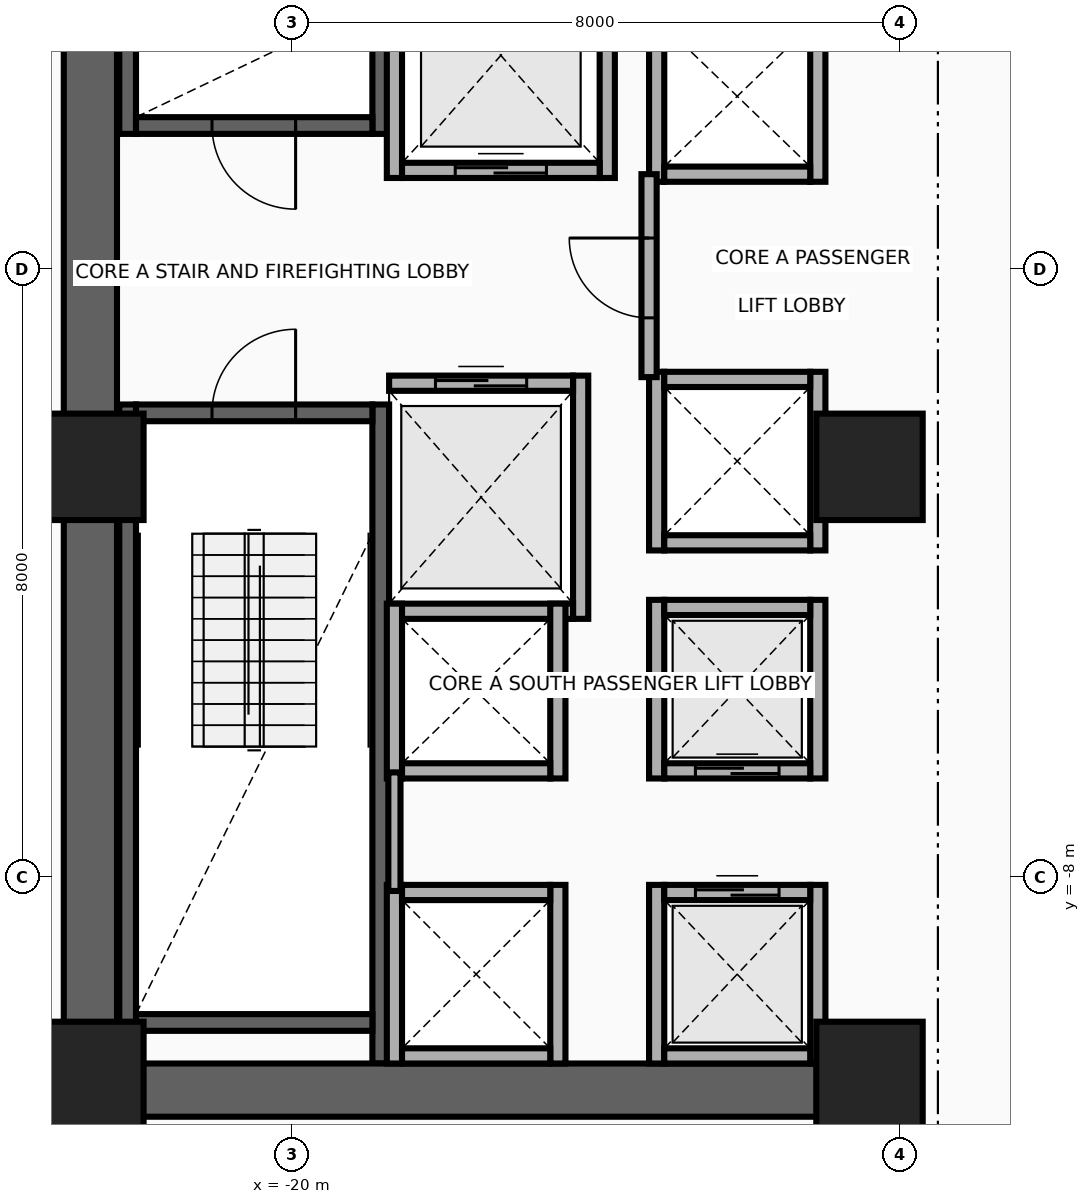
"""IFC4 building model, lengths in metres.
Left out: names, types, materials, properties, quantities, classifications, styles, units other than length and angle.
Written with IfcOpenShell. Run it as: python <this file> out.ifc"""

import sys

from ifc_helpers import new_model, si_unit, direction, frame, frame_2d, origin, origin_2d, place, context, subcontext, project, spatial, rectangle, extrude, source, transform, mapped, element, fill, save


model = new_model("IFC4")
c1 = context("Model", 3, precision=1e-05, world=origin(), true_north=direction((0.0, 1.0)))
c2 = subcontext(c1, "Body", "Model", "MODEL_VIEW")
j1 = project(units=[si_unit("LENGTHUNIT", "METRE"), si_unit("PLANEANGLEUNIT", "RADIAN")], contexts=[c1])
p1 = place(None, origin())
s1 = spatial("IfcSite", under=j1, at=p1, CompositionType="ELEMENT")
p2 = place(p1, origin())
s2 = spatial("IfcBuilding", under=s1, at=p2, CompositionType="ELEMENT")
p3 = place(p2, frame((0.0, 0.0, 92.6)))
s3 = spatial("IfcBuildingStorey", under=s2, at=p3, CompositionType="ELEMENT", Elevation=92.6)
for number, where, z_axis, x_axis in (
    (1, (-22.16, 1.78, 0.0), (0.0, 0.0, 1.0), (0.0, 1.0, 0.0)),
    (2, (-18.83, 1.78, 0.0), (0.0, 0.0, 1.0), (0.0, 1.0, 0.0)),
):
    element("IfcWall", number, at=place(p3, frame(where, z_axis=z_axis, x_axis=x_axis)), inside=s3, PredefinedType="SHEAR", context=c2, shape_type="SweptSolid", body=[
        extrude(rectangle(XDim=8.67, YDim=0.22, at=frame_2d((4.335, 0.0))), origin(), (0.0, 0.0, 1.0), 3.46),
    ])
p4 = place(p3, frame((-22.05, 1.89, 0.0), z_axis=(0.0, 0.0, 1.0), x_axis=(1.0, 0.0, 0.0)))
e3 = element("IfcWall", 3, at=p4, inside=s3, PredefinedType="SHEAR", context=c2, shape_type="SweptSolid", body=[
    extrude(rectangle(XDim=3.11, YDim=0.22, at=frame_2d((1.555, 0.0))), origin(), (0.0, 0.0, 1.0), 3.46),
])
p5 = place(p4, frame((1.0, 0.0, 0.0)))
e4 = element("IfcOpeningElement", 4, at=p5, cuts=e3, PredefinedType="OPENING", context=c2, shape_type="SweptSolid", body=[
    extrude(rectangle(XDim=1.1, YDim=2.15, at=frame_2d((0.55, 1.075))), frame((0.0, 0.125, 0.0), z_axis=(0.0, -1.0, 0.0), x_axis=(1.0, 0.0, 0.0)), (0.0, 0.0, 1.0), 0.25),
])
for number, where, z_axis, x_axis in (
    (5, (-22.16, -10.45, 0.0), (0.0, 0.0, 1.0), (0.0, 1.0, 0.0)),
    (6, (-18.83, -10.45, 0.0), (0.0, 0.0, 1.0), (0.0, 1.0, 0.0)),
):
    element("IfcWall", number, at=place(p3, frame(where, z_axis=z_axis, x_axis=x_axis)), inside=s3, PredefinedType="SHEAR", context=c2, shape_type="SweptSolid", body=[
        extrude(rectangle(XDim=8.67, YDim=0.22, at=frame_2d((4.335, 0.0))), origin(), (0.0, 0.0, 1.0), 3.46),
    ])
p6 = place(p3, frame((-22.05, -9.91, 0.0), z_axis=(0.0, 0.0, 1.0), x_axis=(1.0, 0.0, 0.0)))
e7 = element("IfcWall", 7, at=p6, inside=s3, PredefinedType="SHEAR", context=c2, shape_type="SweptSolid", body=[
    extrude(rectangle(XDim=3.11, YDim=0.22, at=frame_2d((1.555, 0.0))), origin(), (0.0, 0.0, 1.0), 3.46),
])
p7 = place(p3, frame((-22.05, -1.89, 0.0), z_axis=(0.0, 0.0, 1.0), x_axis=(1.0, 0.0, 0.0)))
e8 = element("IfcWall", 8, at=p7, inside=s3, PredefinedType="SHEAR", context=c2, shape_type="SweptSolid", body=[
    extrude(rectangle(XDim=3.11, YDim=0.22, at=frame_2d((1.555, 0.0))), origin(), (0.0, 0.0, 1.0), 3.46),
])
p8 = place(p7, frame((1.0, 0.0, 0.0)))
e9 = element("IfcOpeningElement", 9, at=p8, cuts=e8, PredefinedType="OPENING", context=c2, shape_type="SweptSolid", body=[
    extrude(rectangle(XDim=1.1, YDim=2.15, at=frame_2d((0.55, 1.075))), frame((0.0, 0.125, 0.0), z_axis=(0.0, -1.0, 0.0), x_axis=(1.0, 0.0, 0.0)), (0.0, 0.0, 1.0), 0.25),
])
p9 = place(p3, frame((-22.65, -11.15, 0.0), z_axis=(0.0, 0.0, 1.0), x_axis=(0.0, 1.0, 0.0)))
e10 = element("IfcWall", 10, at=p9, inside=s3, PredefinedType="SHEAR", context=c2, shape_type="SweptSolid", body=[
    extrude(rectangle(XDim=22.3, YDim=0.7, at=frame_2d((11.15, 0.0))), origin(), (0.0, 0.0, 1.0), 3.46),
])
p10 = place(p3, frame((-22.65, -10.8, 0.0), z_axis=(0.0, 0.0, 1.0), x_axis=(1.0, 0.0, 0.0)))
e11 = element("IfcWall", 11, at=p10, inside=s3, PredefinedType="SHEAR", context=c2, shape_type="SweptSolid", body=[
    extrude(rectangle(XDim=10.25, YDim=0.7, at=frame_2d((5.125, 0.0))), origin(), (0.0, 0.0, 1.0), 3.46),
])
m1 = source(origin(), c2, "Body", "SweptSolid", [
    extrude(rectangle(XDim=1.4, YDim=1.4, at=origin_2d()), origin(), (0.0, 0.0, 1.0), 3.7),
])
for number, where, z_axis, x_axis in (
    (12, (-22.65, -10.6, 0.0), (0.0, 0.0, 1.0), (1.0, 0.0, 0.0)),
    (13, (-12.4, -10.6, 0.0), (0.0, 0.0, 1.0), (1.0, 0.0, 0.0)),
    (14, (-22.65, -2.6, 0.0), (0.0, 0.0, 1.0), (1.0, 0.0, 0.0)),
    (15, (-12.4, -2.6, 0.0), (0.0, 0.0, 1.0), (1.0, 0.0, 0.0)),
):
    element("IfcColumn", number, at=place(p3, frame(where, z_axis=z_axis, x_axis=x_axis)), inside=s3, PredefinedType="COLUMN", context=c2, shape_type="MappedRepresentation", body=[
        mapped(m1, transform((0.0, 0.0, 0.0), x_axis=(1.0, 0.0, 0.0), y_axis=(0.0, 1.0, 0.0), z_axis=(0.0, 0.0, 1.0), scale=1.0)),
    ])
for number, where, z_axis, x_axis in (
    (16, (-18.65, 1.2, 0.0), (0.0, 0.0, 1.0), (0.0, 1.0, 0.0)),
    (17, (-15.85, 1.2, 0.0), (0.0, 0.0, 1.0), (0.0, 1.0, 0.0)),
):
    element("IfcWall", number, at=place(p3, frame(where, z_axis=z_axis, x_axis=x_axis)), inside=s3, PredefinedType="MOVABLE", context=c2, shape_type="SweptSolid", body=[
        extrude(rectangle(XDim=3.225, YDim=0.2, at=frame_2d((1.613, 0.0))), origin(), (0.0, 0.0, 1.0), 3.46),
    ])
p11 = place(p3, frame((-18.55, 1.3, 0.0), z_axis=(0.0, 0.0, 1.0), x_axis=(1.0, 0.0, 0.0)))
e18 = element("IfcWall", 18, at=p11, inside=s3, PredefinedType="MOVABLE", context=c2, shape_type="SweptSolid", body=[
    extrude(rectangle(XDim=2.6, YDim=0.2, at=frame_2d((1.3, 0.0))), origin(), (0.0, 0.0, 1.0), 3.46),
])
p12 = place(p11, frame((0.7, 0.0, 0.0)))
e19 = element("IfcOpeningElement", 19, at=p12, cuts=e18, PredefinedType="OPENING", context=c2, shape_type="SweptSolid", body=[
    extrude(rectangle(XDim=1.2, YDim=2.1, at=frame_2d((0.6, 1.05))), frame((0.0, 0.115, 0.0), z_axis=(0.0, -1.0, 0.0), x_axis=(1.0, 0.0, 0.0)), (0.0, 0.0, 1.0), 0.23),
])
p13 = place(p3, frame((-16.2, -4.6, 0.0), z_axis=(0.0, 0.0, 1.0), x_axis=(0.0, 1.0, 0.0)))
e20 = element("IfcWall", 20, at=p13, inside=s3, PredefinedType="MOVABLE", context=c2, shape_type="SweptSolid", body=[
    extrude(rectangle(XDim=3.2, YDim=0.2, at=frame_2d((1.6, 0.0))), origin(), (0.0, 0.0, 1.0), 3.46),
])
p14 = place(p3, frame((-18.72, -4.5, 0.0), z_axis=(0.0, 0.0, 1.0), x_axis=(1.0, 0.0, 0.0)))
e21 = element("IfcWall", 21, at=p14, inside=s3, PredefinedType="MOVABLE", context=c2, shape_type="SweptSolid", body=[
    extrude(rectangle(XDim=2.42, YDim=0.2, at=frame_2d((1.21, 0.0))), origin(), (0.0, 0.0, 1.0), 3.46),
])
p15 = place(p3, frame((-18.72, -1.5, 0.0), z_axis=(0.0, 0.0, 1.0), x_axis=(1.0, 0.0, 0.0)))
e22 = element("IfcWall", 22, at=p15, inside=s3, PredefinedType="MOVABLE", context=c2, shape_type="SweptSolid", body=[
    extrude(rectangle(XDim=2.42, YDim=0.2, at=frame_2d((1.21, 0.0))), origin(), (0.0, 0.0, 1.0), 3.46),
])
p16 = place(p15, frame((0.61, 0.0, 0.0)))
e23 = element("IfcOpeningElement", 23, at=p16, cuts=e22, PredefinedType="OPENING", context=c2, shape_type="SweptSolid", body=[
    extrude(rectangle(XDim=1.2, YDim=2.1, at=frame_2d((0.6, 1.05))), frame((0.0, 0.115, 0.0), z_axis=(0.0, -1.0, 0.0), x_axis=(1.0, 0.0, 0.0)), (0.0, 0.0, 1.0), 0.23),
])
for number, where, z_axis, x_axis in (
    (24, (-15.2, -10.45, 0.0), (0.0, 0.0, 1.0), (0.0, 1.0, 0.0)),
    (25, (-13.08, -10.45, 0.0), (0.0, 0.0, 1.0), (0.0, 1.0, 0.0)),
):
    element("IfcWall", number, at=place(p3, frame(where, z_axis=z_axis, x_axis=x_axis)), inside=s3, PredefinedType="MOVABLE", context=c2, shape_type="SweptSolid", body=[
        extrude(rectangle(XDim=2.35, YDim=0.2, at=frame_2d((1.175, 0.0))), origin(), (0.0, 0.0, 1.0), 2.583),
    ])
p17 = place(p3, frame((-15.1, -10.35, 0.0), z_axis=(0.0, 0.0, 1.0), x_axis=(1.0, 0.0, 0.0)))
e26 = element("IfcWall", 26, at=p17, inside=s3, PredefinedType="MOVABLE", context=c2, shape_type="SweptSolid", body=[
    extrude(rectangle(XDim=1.92, YDim=0.2, at=frame_2d((0.96, 0.0))), origin(), (0.0, 0.0, 1.0), 2.583),
])
p18 = place(p3, frame((-15.1, -8.2, 0.0), z_axis=(0.0, 0.0, 1.0), x_axis=(1.0, 0.0, 0.0)))
e27 = element("IfcWall", 27, at=p18, inside=s3, PredefinedType="MOVABLE", context=c2, shape_type="SweptSolid", body=[
    extrude(rectangle(XDim=1.92, YDim=0.2, at=frame_2d((0.96, 0.0))), origin(), (0.0, 0.0, 1.0), 3.46),
])
p19 = place(p18, frame((0.41, 0.0, 0.0)))
e28 = element("IfcOpeningElement", 28, at=p19, cuts=e27, PredefinedType="OPENING", context=c2, shape_type="SweptSolid", body=[
    extrude(rectangle(XDim=1.1, YDim=2.1, at=frame_2d((0.55, 1.05))), frame((0.0, 0.115, 0.0), z_axis=(0.0, -1.0, 0.0), x_axis=(1.0, 0.0, 0.0)), (0.0, 0.0, 1.0), 0.23),
])
for number, where, z_axis, x_axis in (
    (29, (-15.2, -6.7, 0.0), (0.0, 0.0, 1.0), (0.0, 1.0, 0.0)),
    (30, (-13.08, -6.7, 0.0), (0.0, 0.0, 1.0), (0.0, 1.0, 0.0)),
):
    element("IfcWall", number, at=place(p3, frame(where, z_axis=z_axis, x_axis=x_axis)), inside=s3, PredefinedType="MOVABLE", context=c2, shape_type="SweptSolid", body=[
        extrude(rectangle(XDim=2.35, YDim=0.2, at=frame_2d((1.175, 0.0))), origin(), (0.0, 0.0, 1.0), 3.46),
    ])
p20 = place(p3, frame((-15.1, -6.6, 0.0), z_axis=(0.0, 0.0, 1.0), x_axis=(1.0, 0.0, 0.0)))
e31 = element("IfcWall", 31, at=p20, inside=s3, PredefinedType="MOVABLE", context=c2, shape_type="SweptSolid", body=[
    extrude(rectangle(XDim=1.92, YDim=0.2, at=frame_2d((0.96, 0.0))), origin(), (0.0, 0.0, 1.0), 3.46),
])
p21 = place(p20, frame((0.41, 0.0, 0.0)))
e32 = element("IfcOpeningElement", 32, at=p21, cuts=e31, PredefinedType="OPENING", context=c2, shape_type="SweptSolid", body=[
    extrude(rectangle(XDim=1.1, YDim=2.1, at=frame_2d((0.55, 1.05))), frame((0.0, 0.115, 0.0), z_axis=(0.0, -1.0, 0.0), x_axis=(1.0, 0.0, 0.0)), (0.0, 0.0, 1.0), 0.23),
])
p22 = place(p3, frame((-15.1, -4.45, 0.0), z_axis=(0.0, 0.0, 1.0), x_axis=(1.0, 0.0, 0.0)))
e33 = element("IfcWall", 33, at=p22, inside=s3, PredefinedType="MOVABLE", context=c2, shape_type="SweptSolid", body=[
    extrude(rectangle(XDim=1.92, YDim=0.2, at=frame_2d((0.96, 0.0))), origin(), (0.0, 0.0, 1.0), 3.46),
])
for number, where, z_axis, x_axis in (
    (34, (-18.65, -10.45, 0.0), (0.0, 0.0, 1.0), (0.0, 1.0, 0.0)),
    (35, (-16.5, -10.45, 0.0), (0.0, 0.0, 1.0), (0.0, 1.0, 0.0)),
):
    element("IfcWall", number, at=place(p3, frame(where, z_axis=z_axis, x_axis=x_axis)), inside=s3, PredefinedType="MOVABLE", context=c2, shape_type="SweptSolid", body=[
        extrude(rectangle(XDim=2.35, YDim=0.2, at=frame_2d((1.175, 0.0))), origin(), (0.0, 0.0, 1.0), 2.583),
    ])
p23 = place(p3, frame((-18.55, -10.35, 0.0), z_axis=(0.0, 0.0, 1.0), x_axis=(1.0, 0.0, 0.0)))
e36 = element("IfcWall", 36, at=p23, inside=s3, PredefinedType="MOVABLE", context=c2, shape_type="SweptSolid", body=[
    extrude(rectangle(XDim=1.95, YDim=0.2, at=frame_2d((0.975, 0.0))), origin(), (0.0, 0.0, 1.0), 2.583),
])
p24 = place(p3, frame((-18.55, -8.2, 0.0), z_axis=(0.0, 0.0, 1.0), x_axis=(1.0, 0.0, 0.0)))
e37 = element("IfcWall", 37, at=p24, inside=s3, PredefinedType="MOVABLE", context=c2, shape_type="SweptSolid", body=[
    extrude(rectangle(XDim=1.95, YDim=0.2, at=frame_2d((0.975, 0.0))), origin(), (0.0, 0.0, 1.0), 3.46),
])
for number, where, z_axis, x_axis in (
    (38, (-15.2, 1.15, 0.0), (0.0, 0.0, 1.0), (0.0, 1.0, 0.0)),
    (39, (-13.08, 1.15, 0.0), (0.0, 0.0, 1.0), (0.0, 1.0, 0.0)),
):
    element("IfcWall", number, at=place(p3, frame(where, z_axis=z_axis, x_axis=x_axis)), inside=s3, PredefinedType="MOVABLE", context=c2, shape_type="SweptSolid", body=[
        extrude(rectangle(XDim=2.25, YDim=0.2, at=frame_2d((1.125, 0.0))), origin(), (0.0, 0.0, 1.0), 3.46),
    ])
p25 = place(p3, frame((-15.1, 1.25, 0.0), z_axis=(0.0, 0.0, 1.0), x_axis=(1.0, 0.0, 0.0)))
e40 = element("IfcWall", 40, at=p25, inside=s3, PredefinedType="MOVABLE", context=c2, shape_type="SweptSolid", body=[
    extrude(rectangle(XDim=1.92, YDim=0.2, at=frame_2d((0.96, 0.0))), origin(), (0.0, 0.0, 1.0), 3.46),
])
for number, where, z_axis, x_axis in (
    (41, (-18.65, -6.7, 0.0), (0.0, 0.0, 1.0), (0.0, 1.0, 0.0)),
    (42, (-16.5, -6.7, 0.0), (0.0, 0.0, 1.0), (0.0, 1.0, 0.0)),
):
    element("IfcWall", number, at=place(p3, frame(where, z_axis=z_axis, x_axis=x_axis)), inside=s3, PredefinedType="MOVABLE", context=c2, shape_type="SweptSolid", body=[
        extrude(rectangle(XDim=2.3, YDim=0.2, at=frame_2d((1.15, 0.0))), origin(), (0.0, 0.0, 1.0), 3.46),
    ])
p26 = place(p3, frame((-18.55, -6.6, 0.0), z_axis=(0.0, 0.0, 1.0), x_axis=(1.0, 0.0, 0.0)))
e43 = element("IfcWall", 43, at=p26, inside=s3, PredefinedType="MOVABLE", context=c2, shape_type="SweptSolid", body=[
    extrude(rectangle(XDim=1.95, YDim=0.2, at=frame_2d((0.975, 0.0))), origin(), (0.0, 0.0, 1.0), 3.46),
])
for number, where, z_axis, x_axis in (
    (44, (-15.2, -3.7, 0.0), (0.0, 0.0, 1.0), (0.0, 1.0, 0.0)),
    (45, (-13.08, -3.7, 0.0), (0.0, 0.0, 1.0), (0.0, 1.0, 0.0)),
):
    element("IfcWall", number, at=place(p3, frame(where, z_axis=z_axis, x_axis=x_axis)), inside=s3, PredefinedType="MOVABLE", context=c2, shape_type="SweptSolid", body=[
        extrude(rectangle(XDim=2.35, YDim=0.2, at=frame_2d((1.175, 0.0))), origin(), (0.0, 0.0, 1.0), 3.46),
    ])
for number, where, z_axis, x_axis in (
    (46, (-15.1, -3.6, 0.0), (0.0, 0.0, 1.0), (1.0, 0.0, 0.0)),
    (47, (-15.1, -1.45, 0.0), (0.0, 0.0, 1.0), (1.0, 0.0, 0.0)),
):
    element("IfcWall", number, at=place(p3, frame(where, z_axis=z_axis, x_axis=x_axis)), inside=s3, PredefinedType="MOVABLE", context=c2, shape_type="SweptSolid", body=[
        extrude(rectangle(XDim=1.92, YDim=0.2, at=frame_2d((0.96, 0.0))), origin(), (0.0, 0.0, 1.0), 3.46),
    ])
p27 = place(p3, frame((-15.3, -1.42, 0.0), z_axis=(0.0, 0.0, 1.0), x_axis=(0.0, 1.0, 0.0)))
e48 = element("IfcWall", 48, at=p27, inside=s3, PredefinedType="PARTITIONING", context=c2, shape_type="SweptSolid", body=[
    extrude(rectangle(XDim=2.67, YDim=0.2, at=frame_2d((1.335, 0.0))), origin(), (0.0, 0.0, 1.0), 3.46),
])
p28 = place(p27, frame((0.78, 0.0, 0.0)))
e49 = element("IfcOpeningElement", 49, at=p28, cuts=e48, PredefinedType="OPENING", context=c2, shape_type="SweptSolid", body=[
    extrude(rectangle(XDim=1.05, YDim=2.15, at=frame_2d((0.525, 1.075))), frame((0.0, 0.115, 0.0), z_axis=(0.0, -1.0, 0.0), x_axis=(1.0, 0.0, 0.0)), (0.0, 0.0, 1.0), 0.23),
])
p29 = place(p3, frame((-18.65, -8.18, 0.0), z_axis=(0.0, 0.0, 1.0), x_axis=(0.0, 1.0, 0.0)))
e50 = element("IfcWall", 50, at=p29, inside=s3, PredefinedType="PARTITIONING", context=c2, shape_type="SweptSolid", body=[
    extrude(rectangle(XDim=1.56, YDim=0.16, at=frame_2d((0.78, 0.0))), origin(), (0.0, 0.0, 1.0), 3.46),
])
p30 = place(p12, origin())
e51 = element("IfcDoor", 51, at=p30, inside=s3, OperationType="DOUBLE_DOOR_SLIDING", PredefinedType="DOOR", context=c2, shape_type="SweptSolid", body=[
    extrude(rectangle(XDim=1.2, YDim=2.1, at=frame_2d((0.6, 1.05))), frame((0.0, 0.025, 0.0), z_axis=(0.0, -1.0, 0.0), x_axis=(1.0, 0.0, 0.0)), (0.0, 0.0, 1.0), 0.05),
])
fill(e19, e51)
p31 = place(p16, origin())
e52 = element("IfcDoor", 52, at=p31, inside=s3, OperationType="DOUBLE_DOOR_SLIDING", PredefinedType="DOOR", context=c2, shape_type="SweptSolid", body=[
    extrude(rectangle(XDim=1.2, YDim=2.1, at=frame_2d((0.6, 1.05))), frame((0.0, 0.025, 0.0), z_axis=(0.0, -1.0, 0.0), x_axis=(1.0, 0.0, 0.0)), (0.0, 0.0, 1.0), 0.05),
])
fill(e23, e52)
p32 = place(p19, origin())
e53 = element("IfcDoor", 53, at=p32, inside=s3, OperationType="DOUBLE_DOOR_SLIDING", PredefinedType="DOOR", context=c2, shape_type="SweptSolid", body=[
    extrude(rectangle(XDim=1.1, YDim=2.1, at=frame_2d((0.55, 1.05))), frame((0.0, 0.025, 0.0), z_axis=(0.0, -1.0, 0.0), x_axis=(1.0, 0.0, 0.0)), (0.0, 0.0, 1.0), 0.05),
])
fill(e28, e53)
p33 = place(p21, origin())
e54 = element("IfcDoor", 54, at=p33, inside=s3, OperationType="DOUBLE_DOOR_SLIDING", PredefinedType="DOOR", context=c2, shape_type="SweptSolid", body=[
    extrude(rectangle(XDim=1.1, YDim=2.1, at=frame_2d((0.55, 1.05))), frame((0.0, 0.025, 0.0), z_axis=(0.0, -1.0, 0.0), x_axis=(1.0, 0.0, 0.0)), (0.0, 0.0, 1.0), 0.05),
])
fill(e32, e54)
p34 = place(p28, origin())
e55 = element("IfcDoor", 55, at=p34, inside=s3, OperationType="SINGLE_SWING_RIGHT", PredefinedType="DOOR", context=c2, shape_type="SweptSolid", body=[
    extrude(rectangle(XDim=1.05, YDim=2.15, at=frame_2d((0.525, 1.075))), frame((0.0, 0.025, 0.0), z_axis=(0.0, -1.0, 0.0), x_axis=(1.0, 0.0, 0.0)), (0.0, 0.0, 1.0), 0.05),
])
fill(e49, e55)
p35 = place(p5, frame((1.1, 0.0, 0.0), z_axis=(0.0, 0.0, 1.0), x_axis=(-1.0, 0.0, 0.0)))
e56 = element("IfcDoor", 56, at=p35, inside=s3, OperationType="SINGLE_SWING_LEFT", PredefinedType="DOOR", context=c2, shape_type="SweptSolid", body=[
    extrude(rectangle(XDim=1.1, YDim=2.15, at=frame_2d((0.55, 1.075))), frame((0.0, 0.025, 0.0), z_axis=(0.0, -1.0, 0.0), x_axis=(1.0, 0.0, 0.0)), (0.0, 0.0, 1.0), 0.05),
])
fill(e4, e56)
p36 = place(p8, origin())
e57 = element("IfcDoor", 57, at=p36, inside=s3, OperationType="SINGLE_SWING_RIGHT", PredefinedType="DOOR", context=c2, shape_type="SweptSolid", body=[
    extrude(rectangle(XDim=1.1, YDim=2.15, at=frame_2d((0.55, 1.075))), frame((0.0, 0.025, 0.0), z_axis=(0.0, -1.0, 0.0), x_axis=(1.0, 0.0, 0.0)), (0.0, 0.0, 1.0), 0.05),
])
fill(e9, e57)
save(model, sys.argv[1])
